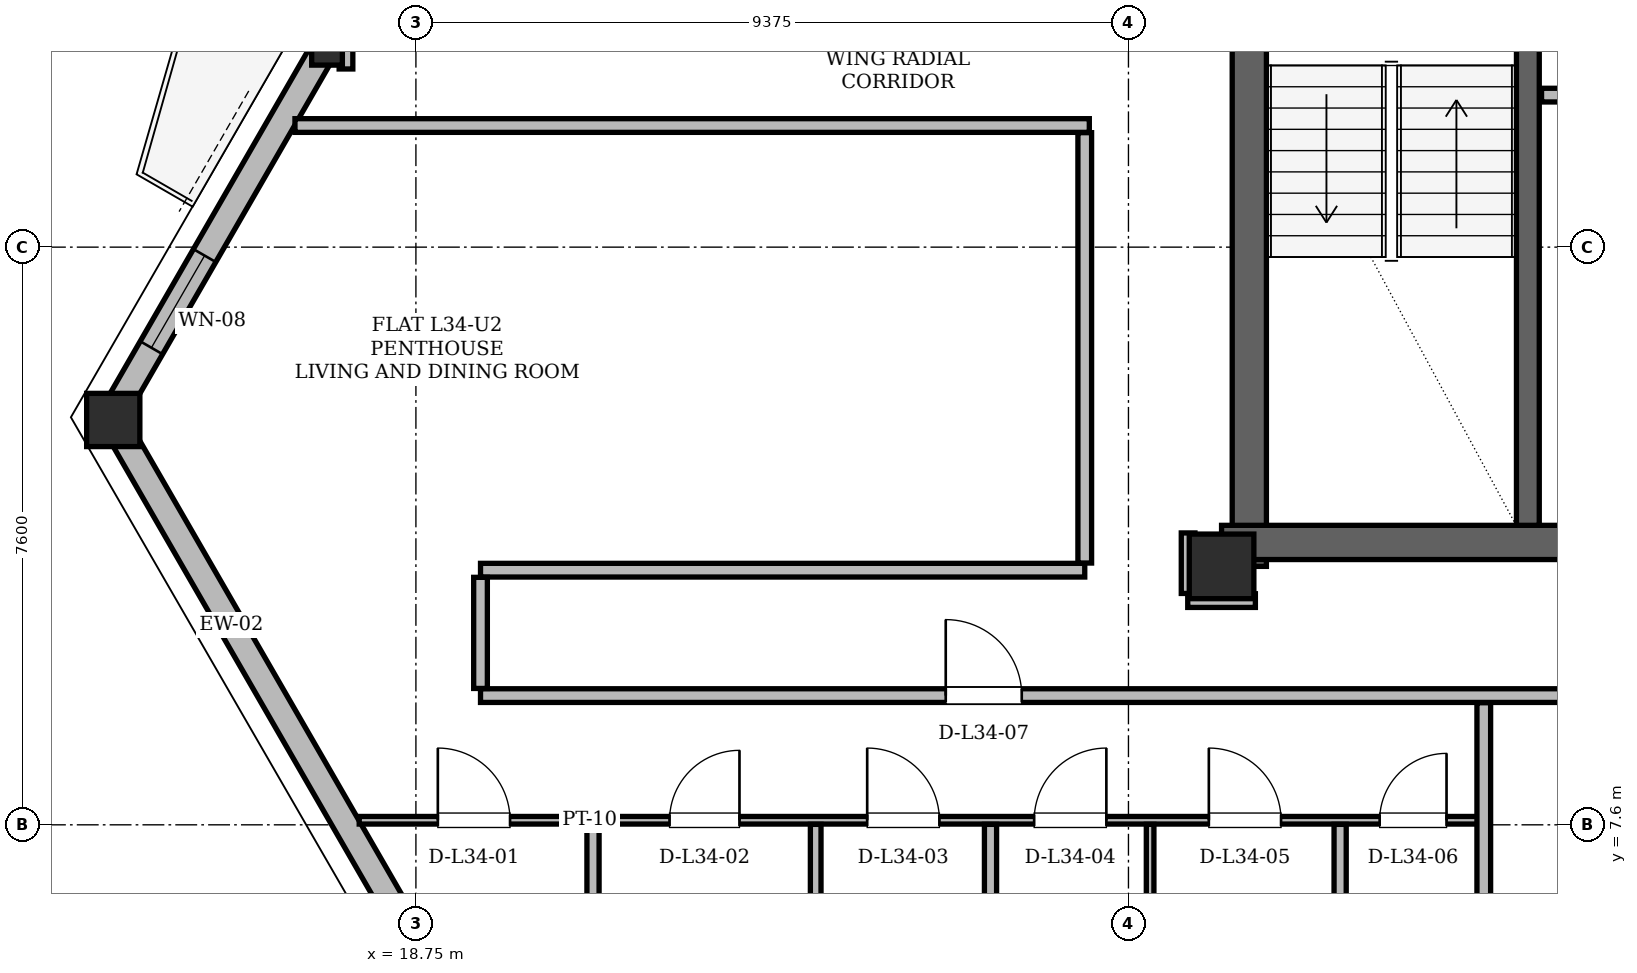
"""IFC4 building model, lengths in metres.
Left out: names, types, materials, properties, quantities, classifications, styles, units other than length and angle.
Written with IfcOpenShell. Run it as: python <this file> out.ifc"""

import sys

from ifc_helpers import new_model, si_unit, direction, frame, frame_2d, origin, origin_2d, place, context, subcontext, project, spatial, rectangle, hollow_rectangle, i_section, extrude, element, fill, save


model = new_model("IFC4")
c1 = context("Model", 3, precision=1e-05, world=origin(), true_north=direction((0.0, 1.0)))
c2 = subcontext(c1, "Body", "Model", "MODEL_VIEW")
j1 = project(units=[si_unit("LENGTHUNIT", "METRE"), si_unit("PLANEANGLEUNIT", "RADIAN")], contexts=[c1])
p1 = place(None, origin())
s1 = spatial("IfcSite", under=j1, at=p1, CompositionType="ELEMENT")
p2 = place(p1, origin())
s2 = spatial("IfcBuilding", under=s1, at=p2, CompositionType="ELEMENT")
p3 = place(p2, frame((0.0, 0.0, 130.2)))
s3 = spatial("IfcBuildingStorey", under=s2, at=p3, CompositionType="ELEMENT", Elevation=130.2)
p4 = place(p3, frame((29.35, 11.0, 0.0), z_axis=(0.0, 0.0, 1.0), x_axis=(1.0, 0.0, 0.0)))
e1 = element("IfcColumn", 1, at=p4, inside=s3, PredefinedType="COLUMN", context=c2, shape_type="SweptSolid", body=[
    extrude(hollow_rectangle(XDim=0.85, YDim=0.85, WallThickness=0.07, at=origin_2d()), origin(), (0.0, 0.0, 1.0), 3.6),
])
p5 = place(p3, frame((14.742, 12.962, 0.005), z_axis=(0.014477524401, -0.019915092251, 0.999696849244), x_axis=(0.808855444891, 0.588007541849, 0.0)))
e2 = element("IfcColumn", 2, at=p5, inside=s3, PredefinedType="COLUMN", context=c2, shape_type="SweptSolid", body=[
    extrude(hollow_rectangle(XDim=0.7, YDim=0.7, WallThickness=0.055, at=origin_2d()), origin(), (0.0, 0.0, 1.0), 3.592),
])
p6 = place(p3, frame((17.552, 17.829, 0.005), z_axis=(0.016109224365, -0.017128795528, 0.999723510404), x_axis=(0.72845453556, 0.685094146539, 0.0)))
e3 = element("IfcColumn", 3, at=p6, inside=s3, PredefinedType="COLUMN", context=c2, shape_type="SweptSolid", body=[
    extrude(i_section(OverallWidth=0.404, OverallDepth=0.406, WebThickness=0.027, FlangeThickness=0.044, at=origin_2d()), origin(), (0.0, 0.0, 1.0), 3.592),
])
p7 = place(p3, frame((29.715, 11.0, 0.0), z_axis=(0.0, 0.0, 1.0), x_axis=(0.0, 1.0, 0.0)))
e4 = element("IfcWall", 4, at=p7, inside=s3, PredefinedType="SHEAR", context=c2, shape_type="SweptSolid", body=[
    extrude(rectangle(XDim=13.3, YDim=0.45, at=frame_2d((6.65, 0.0))), origin(), (0.0, 0.0, 1.0), 3.34),
])
p8 = place(p3, frame((29.35, 11.315, 0.0), z_axis=(0.0, 0.0, 1.0), x_axis=(1.0, 0.0, 0.0)))
e5 = element("IfcWall", 5, at=p8, inside=s3, PredefinedType="SHEAR", context=c2, shape_type="SweptSolid", body=[
    extrude(rectangle(XDim=7.1, YDim=0.45, at=frame_2d((3.55, 0.0))), origin(), (0.0, 0.0, 1.0), 3.34),
])
p9 = place(p3, frame((33.38, 11.54, 0.0), z_axis=(0.0, 0.0, 1.0), x_axis=(0.0, 1.0, 0.0)))
e6 = element("IfcWall", 6, at=p9, inside=s3, PredefinedType="SHEAR", context=c2, shape_type="SweptSolid", body=[
    extrude(rectangle(XDim=7.62, YDim=0.3, at=frame_2d((3.81, 0.0))), origin(), (0.0, 0.0, 1.0), 3.34),
])
p10 = place(p3, frame((14.742, 12.962, 0.0), z_axis=(0.0, 0.0, 1.0), x_axis=(0.499998958472, -0.86602600511, 0.0)))
e7 = element("IfcWall", 7, at=p10, inside=s3, PredefinedType="SOLIDWALL", context=c2, shape_type="SweptSolid", body=[
    extrude(rectangle(XDim=10.395, YDim=0.34, at=frame_2d((5.197, 0.0))), origin(), (0.0, 0.0, 1.0), 2.558),
])
p11 = place(p3, frame((32.303, 43.378, 0.0), z_axis=(0.0, 0.0, 1.0), x_axis=(-0.499999044439, -0.866025955477, 0.0)))
e8 = element("IfcWall", 8, at=p11, inside=s3, PredefinedType="SOLIDWALL", context=c2, shape_type="SweptSolid", body=[
    extrude(rectangle(XDim=35.122, YDim=0.34, at=frame_2d((17.561, 0.0))), origin(), (0.0, 0.0, 1.0), 2.558),
])
p12 = place(p11, frame((8.034, 0.0, 0.0)))
e9 = element("IfcOpeningElement", 9, at=p12, cuts=e8, PredefinedType="OPENING", context=c2, shape_type="SweptSolid", body=[
    extrude(rectangle(XDim=1.5, YDim=2.2, at=frame_2d((0.75, 1.1))), frame((0.0, 0.17, 0.0), z_axis=(0.0, -1.0, 0.0), x_axis=(1.0, 0.0, 0.0)), (0.0, 0.0, 1.0), 0.34),
])
p13 = place(p11, frame((26.832, 0.0, 0.0)))
e10 = element("IfcOpeningElement", 10, at=p13, cuts=e8, PredefinedType="OPENING", context=c2, shape_type="SweptSolid", body=[
    extrude(rectangle(XDim=1.5, YDim=2.2, at=frame_2d((0.75, 1.1))), frame((0.0, 0.17, 0.0), z_axis=(0.0, -1.0, 0.0), x_axis=(1.0, 0.0, 0.0)), (0.0, 0.0, 1.0), 0.34),
])
p14 = place(p11, frame((32.666, 0.0, 0.85)))
e11 = element("IfcOpeningElement", 11, at=p14, cuts=e8, PredefinedType="OPENING", context=c2, shape_type="SweptSolid", body=[
    extrude(rectangle(XDim=1.4, YDim=1.598, at=frame_2d((0.7, 0.799))), frame((0.0, 0.17, 0.0), z_axis=(0.0, -1.0, 0.0), x_axis=(1.0, 0.0, 0.0)), (0.0, 0.0, 1.0), 0.34),
])
p15 = place(p11, frame((22.593, 0.0, 0.85)))
e12 = element("IfcOpeningElement", 12, at=p15, cuts=e8, PredefinedType="OPENING", context=c2, shape_type="SweptSolid", body=[
    extrude(rectangle(XDim=1.2, YDim=1.48, at=frame_2d((0.6, 0.74))), frame((0.0, 0.17, 0.0), z_axis=(0.0, -1.0, 0.0), x_axis=(1.0, 0.0, 0.0)), (0.0, 0.0, 1.0), 0.34),
])
p16 = place(p11, frame((2.413, 0.0, 0.85)))
e13 = element("IfcOpeningElement", 13, at=p16, cuts=e8, PredefinedType="OPENING", context=c2, shape_type="SweptSolid", body=[
    extrude(rectangle(XDim=1.4, YDim=1.598, at=frame_2d((0.7, 0.799))), frame((0.0, 0.17, 0.0), z_axis=(0.0, -1.0, 0.0), x_axis=(1.0, 0.0, 0.0)), (0.0, 0.0, 1.0), 0.34),
])
p17 = place(p11, frame((13.476, 0.0, 0.85)))
e14 = element("IfcOpeningElement", 14, at=p17, cuts=e8, PredefinedType="OPENING", context=c2, shape_type="SweptSolid", body=[
    extrude(rectangle(XDim=2.5, YDim=1.598, at=frame_2d((1.25, 0.799))), frame((0.0, 0.17, 0.0), z_axis=(0.0, -1.0, 0.0), x_axis=(1.0, 0.0, 0.0)), (0.0, 0.0, 1.0), 0.34),
])
p18 = place(p11, frame((18.259, 0.0, 0.85)))
e15 = element("IfcOpeningElement", 15, at=p18, cuts=e8, PredefinedType="OPENING", context=c2, shape_type="SweptSolid", body=[
    extrude(rectangle(XDim=1.2, YDim=1.48, at=frame_2d((0.6, 0.74))), frame((0.0, 0.17, 0.0), z_axis=(0.0, -1.0, 0.0), x_axis=(1.0, 0.0, 0.0)), (0.0, 0.0, 1.0), 0.34),
])
p19 = place(p11, frame((20.455, 0.0, 0.85)))
e16 = element("IfcOpeningElement", 16, at=p19, cuts=e8, PredefinedType="OPENING", context=c2, shape_type="SweptSolid", body=[
    extrude(rectangle(XDim=1.2, YDim=1.48, at=frame_2d((0.6, 0.74))), frame((0.0, 0.17, 0.0), z_axis=(0.0, -1.0, 0.0), x_axis=(1.0, 0.0, 0.0)), (0.0, 0.0, 1.0), 0.34),
])
p20 = place(p3, frame((33.56, 17.2, 0.0), z_axis=(0.0, 0.0, 1.0), x_axis=(1.0, 0.0, 0.0)))
e17 = element("IfcWall", 17, at=p20, inside=s3, PredefinedType="PARTITIONING", context=c2, shape_type="SweptSolid", body=[
    extrude(rectangle(XDim=2.66, YDim=0.18, at=frame_2d((1.33, 0.0))), origin(), (0.0, 0.0, 1.0), 3.34),
])
p21 = place(p3, frame((18.004, 7.66, 0.0), z_axis=(0.0, 0.0, 1.0), x_axis=(1.0, 0.0, 0.0)))
e18 = element("IfcWall", 18, at=p21, inside=s3, PredefinedType="PARTITIONING", context=c2, shape_type="SweptSolid", body=[
    extrude(rectangle(XDim=14.846, YDim=0.1, at=frame_2d((7.423, 0.0))), origin(), (0.0, 0.0, 1.0), 2.794),
])
p22 = place(p21, frame((1.035, 0.0, 0.0)))
e19 = element("IfcOpeningElement", 19, at=p22, cuts=e18, PredefinedType="OPENING", context=c2, shape_type="SweptSolid", body=[
    extrude(rectangle(XDim=0.95, YDim=2.1, at=frame_2d((0.475, 1.05))), frame((0.0, 0.05, 0.0), z_axis=(0.0, -1.0, 0.0), x_axis=(1.0, 0.0, 0.0)), (0.0, 0.0, 1.0), 0.1),
])
p23 = place(p21, frame((4.083, 0.0, 0.0)))
e20 = element("IfcOpeningElement", 20, at=p23, cuts=e18, PredefinedType="OPENING", context=c2, shape_type="SweptSolid", body=[
    extrude(rectangle(XDim=0.92, YDim=2.12, at=frame_2d((0.46, 1.06))), frame((0.0, 0.05, 0.0), z_axis=(0.0, -1.0, 0.0), x_axis=(1.0, 0.0, 0.0)), (0.0, 0.0, 1.0), 0.1),
])
p24 = place(p21, frame((6.684, 0.0, 0.0)))
e21 = element("IfcOpeningElement", 21, at=p24, cuts=e18, PredefinedType="OPENING", context=c2, shape_type="SweptSolid", body=[
    extrude(rectangle(XDim=0.95, YDim=2.1, at=frame_2d((0.475, 1.05))), frame((0.0, 0.05, 0.0), z_axis=(0.0, -1.0, 0.0), x_axis=(1.0, 0.0, 0.0)), (0.0, 0.0, 1.0), 0.1),
])
p25 = place(p21, frame((8.88, 0.0, 0.0)))
e22 = element("IfcOpeningElement", 22, at=p25, cuts=e18, PredefinedType="OPENING", context=c2, shape_type="SweptSolid", body=[
    extrude(rectangle(XDim=0.95, YDim=2.1, at=frame_2d((0.475, 1.05))), frame((0.0, 0.05, 0.0), z_axis=(0.0, -1.0, 0.0), x_axis=(1.0, 0.0, 0.0)), (0.0, 0.0, 1.0), 0.1),
])
p26 = place(p21, frame((11.179, 0.0, 0.0)))
e23 = element("IfcOpeningElement", 23, at=p26, cuts=e18, PredefinedType="OPENING", context=c2, shape_type="SweptSolid", body=[
    extrude(rectangle(XDim=0.95, YDim=2.1, at=frame_2d((0.475, 1.05))), frame((0.0, 0.05, 0.0), z_axis=(0.0, -1.0, 0.0), x_axis=(1.0, 0.0, 0.0)), (0.0, 0.0, 1.0), 0.1),
])
p27 = place(p21, frame((13.426, 0.0, 0.0)))
e24 = element("IfcOpeningElement", 24, at=p27, cuts=e18, PredefinedType="OPENING", context=c2, shape_type="SweptSolid", body=[
    extrude(rectangle(XDim=0.88, YDim=2.08, at=frame_2d((0.44, 1.04))), frame((0.0, 0.05, 0.0), z_axis=(0.0, -1.0, 0.0), x_axis=(1.0, 0.0, 0.0)), (0.0, 0.0, 1.0), 0.1),
])
p28 = place(p3, frame((19.6, 9.3, 0.0), z_axis=(0.0, 0.0, 1.0), x_axis=(1.0, 0.0, 0.0)))
e25 = element("IfcWall", 25, at=p28, inside=s3, PredefinedType="PARTITIONING", context=c2, shape_type="SweptSolid", body=[
    extrude(rectangle(XDim=30.4, YDim=0.18, at=frame_2d((15.2, 0.0))), origin(), (0.0, 0.0, 1.0), 2.794),
])
p29 = place(p28, frame((6.121, 0.0, 0.0)))
e26 = element("IfcOpeningElement", 26, at=p29, cuts=e25, PredefinedType="OPENING", context=c2, shape_type="SweptSolid", body=[
    extrude(rectangle(XDim=1.0, YDim=2.18, at=frame_2d((0.5, 1.09))), frame((0.0, 0.09, 0.0), z_axis=(0.0, -1.0, 0.0), x_axis=(1.0, 0.0, 0.0)), (0.0, 0.0, 1.0), 0.18),
])
p30 = place(p28, frame((15.05, 0.0, 0.0)))
e27 = element("IfcOpeningElement", 27, at=p30, cuts=e25, PredefinedType="OPENING", context=c2, shape_type="SweptSolid", body=[
    extrude(rectangle(XDim=1.3, YDim=2.2, at=frame_2d((0.65, 1.1))), frame((0.0, 0.09, 0.0), z_axis=(0.0, -1.0, 0.0), x_axis=(1.0, 0.0, 0.0)), (0.0, 0.0, 1.0), 0.18),
])
p31 = place(p28, frame((24.629, 0.0, 0.0)))
e28 = element("IfcOpeningElement", 28, at=p31, cuts=e25, PredefinedType="OPENING", context=c2, shape_type="SweptSolid", body=[
    extrude(rectangle(XDim=1.0, YDim=2.18, at=frame_2d((0.5, 1.09))), frame((0.0, 0.09, 0.0), z_axis=(0.0, -1.0, 0.0), x_axis=(1.0, 0.0, 0.0)), (0.0, 0.0, 1.0), 0.18),
])
p32 = place(p3, frame((28.905, 10.55, 0.0), z_axis=(0.0, 0.0, 1.0), x_axis=(1.0, 0.0, 0.0)))
e29 = element("IfcWall", 29, at=p32, inside=s3, PredefinedType="PARTITIONING", context=c2, shape_type="SweptSolid", body=[
    extrude(rectangle(XDim=0.89, YDim=0.18, at=frame_2d((0.445, 0.0))), origin(), (0.0, 0.0, 1.0), 3.34),
])
p33 = place(p3, frame((19.6, 10.95, 0.0), z_axis=(0.0, 0.0, 1.0), x_axis=(1.0, 0.0, 0.0)))
e30 = element("IfcWall", 30, at=p33, inside=s3, PredefinedType="PARTITIONING", context=c2, shape_type="SweptSolid", body=[
    extrude(rectangle(XDim=7.95, YDim=0.18, at=frame_2d((3.975, 0.0))), origin(), (0.0, 0.0, 1.0), 3.34),
])
p34 = place(p3, frame((17.159, 16.8, 0.0), z_axis=(0.0, 0.0, 1.0), x_axis=(1.0, 0.0, 0.0)))
e31 = element("IfcWall", 31, at=p34, inside=s3, PredefinedType="PARTITIONING", context=c2, shape_type="SweptSolid", body=[
    extrude(rectangle(XDim=10.451, YDim=0.18, at=frame_2d((5.226, 0.0))), origin(), (0.0, 0.0, 1.0), 3.34),
])
p35 = place(p3, frame((17.83, 17.544, 0.0), z_axis=(0.0, 0.0, 1.0), x_axis=(0.0, 1.0, 0.0)))
e32 = element("IfcWall", 32, at=p35, inside=s3, PredefinedType="PARTITIONING", context=c2, shape_type="SweptSolid", body=[
    extrude(rectangle(XDim=0.419, YDim=0.18, at=frame_2d((0.209, 0.0))), origin(), (0.0, 0.0, 1.0), 2.558),
])
p36 = place(p3, frame((19.6, 9.394, 0.0), z_axis=(0.0, 0.0, 1.0), x_axis=(0.0, 1.0, 0.0)))
e33 = element("IfcWall", 33, at=p36, inside=s3, PredefinedType="PARTITIONING", context=c2, shape_type="SweptSolid", body=[
    extrude(rectangle(XDim=1.462, YDim=0.18, at=frame_2d((0.731, 0.0))), origin(), (0.0, 0.0, 1.0), 3.34),
])
p37 = place(p3, frame((21.08, 4.134, 0.0), z_axis=(0.0, 0.0, 1.0), x_axis=(0.0, 1.0, 0.0)))
e34 = element("IfcWall", 34, at=p37, inside=s3, PredefinedType="PARTITIONING", context=c2, shape_type="SweptSolid", body=[
    extrude(rectangle(XDim=3.472, YDim=0.16, at=frame_2d((1.736, 0.0))), origin(), (0.0, 0.0, 1.0), 2.794),
])
p38 = place(p3, frame((24.01, 4.134, 0.0), z_axis=(0.0, 0.0, 1.0), x_axis=(0.0, 1.0, 0.0)))
e35 = element("IfcWall", 35, at=p38, inside=s3, PredefinedType="PARTITIONING", context=c2, shape_type="SweptSolid", body=[
    extrude(rectangle(XDim=3.472, YDim=0.14, at=frame_2d((1.736, 0.0))), origin(), (0.0, 0.0, 1.0), 2.794),
])
p39 = place(p3, frame((26.31, 4.134, 0.0), z_axis=(0.0, 0.0, 1.0), x_axis=(0.0, 1.0, 0.0)))
e36 = element("IfcWall", 36, at=p39, inside=s3, PredefinedType="PARTITIONING", context=c2, shape_type="SweptSolid", body=[
    extrude(rectangle(XDim=3.472, YDim=0.16, at=frame_2d((1.736, 0.0))), origin(), (0.0, 0.0, 1.0), 2.926),
])
p40 = place(p3, frame((27.55, 11.044, 0.0), z_axis=(0.0, 0.0, 1.0), x_axis=(0.0, 1.0, 0.0)))
e37 = element("IfcWall", 37, at=p40, inside=s3, PredefinedType="PARTITIONING", context=c2, shape_type="SweptSolid", body=[
    extrude(rectangle(XDim=5.662, YDim=0.18, at=frame_2d((2.831, 0.0))), origin(), (0.0, 0.0, 1.0), 2.794),
])
p41 = place(p3, frame((28.41, 4.134, 0.0), z_axis=(0.0, 0.0, 1.0), x_axis=(0.0, 1.0, 0.0)))
e38 = element("IfcWall", 38, at=p41, inside=s3, PredefinedType="PARTITIONING", context=c2, shape_type="SweptSolid", body=[
    extrude(rectangle(XDim=3.472, YDim=0.1, at=frame_2d((1.736, 0.0))), origin(), (0.0, 0.0, 1.0), 3.34),
])
p42 = place(p3, frame((28.91, 10.644, 0.0), z_axis=(0.0, 0.0, 1.0), x_axis=(0.0, 1.0, 0.0)))
e39 = element("IfcWall", 39, at=p42, inside=s3, PredefinedType="PARTITIONING", context=c2, shape_type="SweptSolid", body=[
    extrude(rectangle(XDim=0.796, YDim=0.18, at=frame_2d((0.398, 0.0))), origin(), (0.0, 0.0, 1.0), 2.794),
])
p43 = place(p3, frame((30.91, 4.134, 0.0), z_axis=(0.0, 0.0, 1.0), x_axis=(0.0, 1.0, 0.0)))
e40 = element("IfcWall", 40, at=p43, inside=s3, PredefinedType="PARTITIONING", context=c2, shape_type="SweptSolid", body=[
    extrude(rectangle(XDim=3.472, YDim=0.16, at=frame_2d((1.736, 0.0))), origin(), (0.0, 0.0, 1.0), 2.926),
])
p44 = place(p3, frame((32.8, 5.094, 0.0), z_axis=(0.0, 0.0, 1.0), x_axis=(0.0, 1.0, 0.0)))
e41 = element("IfcWall", 41, at=p44, inside=s3, PredefinedType="PARTITIONING", context=c2, shape_type="SweptSolid", body=[
    extrude(rectangle(XDim=4.112, YDim=0.18, at=frame_2d((2.056, 0.0))), origin(), (0.0, 0.0, 1.0), 2.926),
])
p45 = place(p14, origin())
e42 = element("IfcWindow", 42, at=p45, inside=s3, PartitioningType="SINGLE_PANEL", PredefinedType="WINDOW", context=c2, shape_type="SweptSolid", body=[
    extrude(rectangle(XDim=1.4, YDim=1.598, at=frame_2d((0.7, 0.799))), frame((0.0, 0.03, 0.0), z_axis=(0.0, -1.0, 0.0), x_axis=(1.0, 0.0, 0.0)), (0.0, 0.0, 1.0), 0.06),
])
fill(e11, e42)
p46 = place(p22, origin())
e43 = element("IfcDoor", 43, at=p46, inside=s3, OperationType="SINGLE_SWING_LEFT", PredefinedType="DOOR", context=c2, shape_type="SweptSolid", body=[
    extrude(rectangle(XDim=0.95, YDim=2.1, at=frame_2d((0.475, 1.05))), frame((0.0, 0.025, 0.0), z_axis=(0.0, -1.0, 0.0), x_axis=(1.0, 0.0, 0.0)), (0.0, 0.0, 1.0), 0.05),
])
fill(e19, e43)
p47 = place(p23, origin())
e44 = element("IfcDoor", 44, at=p47, inside=s3, OperationType="SINGLE_SWING_RIGHT", PredefinedType="DOOR", context=c2, shape_type="SweptSolid", body=[
    extrude(rectangle(XDim=0.92, YDim=2.12, at=frame_2d((0.46, 1.06))), frame((0.0, 0.025, 0.0), z_axis=(0.0, -1.0, 0.0), x_axis=(1.0, 0.0, 0.0)), (0.0, 0.0, 1.0), 0.05),
])
fill(e20, e44)
p48 = place(p24, origin())
e45 = element("IfcDoor", 45, at=p48, inside=s3, OperationType="SINGLE_SWING_LEFT", PredefinedType="DOOR", context=c2, shape_type="SweptSolid", body=[
    extrude(rectangle(XDim=0.95, YDim=2.1, at=frame_2d((0.475, 1.05))), frame((0.0, 0.025, 0.0), z_axis=(0.0, -1.0, 0.0), x_axis=(1.0, 0.0, 0.0)), (0.0, 0.0, 1.0), 0.05),
])
fill(e21, e45)
p49 = place(p25, origin())
e46 = element("IfcDoor", 46, at=p49, inside=s3, OperationType="SINGLE_SWING_RIGHT", PredefinedType="DOOR", context=c2, shape_type="SweptSolid", body=[
    extrude(rectangle(XDim=0.95, YDim=2.1, at=frame_2d((0.475, 1.05))), frame((0.0, 0.025, 0.0), z_axis=(0.0, -1.0, 0.0), x_axis=(1.0, 0.0, 0.0)), (0.0, 0.0, 1.0), 0.05),
])
fill(e22, e46)
p50 = place(p26, origin())
e47 = element("IfcDoor", 47, at=p50, inside=s3, OperationType="SINGLE_SWING_LEFT", PredefinedType="DOOR", context=c2, shape_type="SweptSolid", body=[
    extrude(rectangle(XDim=0.95, YDim=2.1, at=frame_2d((0.475, 1.05))), frame((0.0, 0.025, 0.0), z_axis=(0.0, -1.0, 0.0), x_axis=(1.0, 0.0, 0.0)), (0.0, 0.0, 1.0), 0.05),
])
fill(e23, e47)
p51 = place(p27, origin())
e48 = element("IfcDoor", 48, at=p51, inside=s3, OperationType="SINGLE_SWING_RIGHT", PredefinedType="DOOR", context=c2, shape_type="SweptSolid", body=[
    extrude(rectangle(XDim=0.88, YDim=2.08, at=frame_2d((0.44, 1.04))), frame((0.0, 0.025, 0.0), z_axis=(0.0, -1.0, 0.0), x_axis=(1.0, 0.0, 0.0)), (0.0, 0.0, 1.0), 0.05),
])
fill(e24, e48)
p52 = place(p29, origin())
e49 = element("IfcDoor", 49, at=p52, inside=s3, OperationType="SINGLE_SWING_LEFT", PredefinedType="DOOR", context=c2, shape_type="SweptSolid", body=[
    extrude(rectangle(XDim=1.0, YDim=2.18, at=frame_2d((0.5, 1.09))), frame((0.0, 0.025, 0.0), z_axis=(0.0, -1.0, 0.0), x_axis=(1.0, 0.0, 0.0)), (0.0, 0.0, 1.0), 0.05),
])
fill(e26, e49)
save(model, sys.argv[1])
